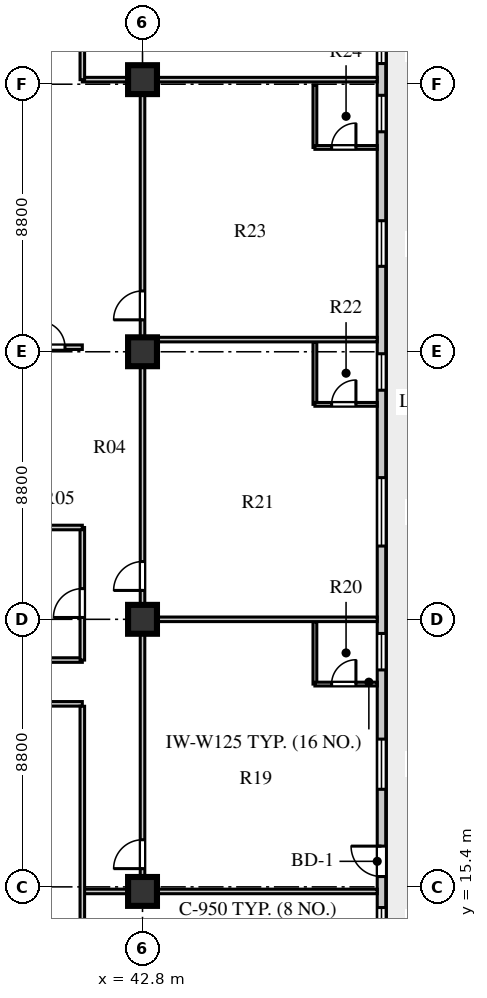
"""IFC4 building model, lengths in metres.
Left out: names, types, materials, properties, quantities, classifications, styles, units other than length and angle.
Written with IfcOpenShell. Run it as: python <this file> out.ifc"""

import sys

from ifc_helpers import new_model, si_unit, direction, frame, frame_2d, origin, origin_2d, place, context, subcontext, project, spatial, rectangle, extrude, element, fill, save


model = new_model("IFC4")
c1 = context("Model", 3, precision=1e-05, world=origin(), true_north=direction((0.0, 1.0)))
c2 = subcontext(c1, "Body", "Model", "MODEL_VIEW")
j1 = project(units=[si_unit("LENGTHUNIT", "METRE"), si_unit("PLANEANGLEUNIT", "RADIAN")], contexts=[c1])
p1 = place(None, origin())
s1 = spatial("IfcSite", under=j1, at=p1, CompositionType="ELEMENT")
p2 = place(p1, origin())
s2 = spatial("IfcBuilding", under=s1, at=p2, CompositionType="ELEMENT")
p3 = place(p2, frame((0.0, 0.0, 196.4)))
s3 = spatial("IfcBuildingStorey", under=s2, at=p3, CompositionType="ELEMENT", Elevation=196.4)
for number, where, z_axis, x_axis in (
    (1, (42.8, 15.25, 0.0), (0.0, 0.0, 1.0), (1.0, 0.0, 0.0)),
    (2, (42.8, 24.2, 0.0), (0.0, 0.0, 1.0), (1.0, 0.0, 0.0)),
    (3, (42.8, 33.0, 0.0), (0.0, 0.0, 1.0), (1.0, 0.0, 0.0)),
    (4, (42.8, 41.95, 0.0), (0.0, 0.0, 1.0), (1.0, 0.0, 0.0)),
):
    element("IfcColumn", number, at=place(p3, frame(where, z_axis=z_axis, x_axis=x_axis)), inside=s3, PredefinedType="COLUMN", context=c2, shape_type="SweptSolid", body=[
        extrude(rectangle(XDim=0.95, YDim=0.95, at=origin_2d()), origin(), (0.0, 0.0, 1.0), 3.6),
    ])
p4 = place(p3, frame((50.66, 13.13, 0.0), z_axis=(0.0, 0.0, 1.0), x_axis=(0.0, 1.0, 0.0)))
e5 = element("IfcWall", 5, at=p4, inside=s3, PredefinedType="STANDARD", context=c2, shape_type="SweptSolid", body=[
    extrude(rectangle(XDim=30.94, YDim=0.28, at=frame_2d((15.47, 0.0))), origin(), (0.0, 0.0, 1.0), 3.6),
])
p5 = place(p4, frame((0.64, 0.0, 0.8)))
e6 = element("IfcOpeningElement", 6, at=p5, cuts=e5, PredefinedType="OPENING", context=c2, shape_type="SweptSolid", body=[
    extrude(rectangle(XDim=0.95, YDim=1.65, at=frame_2d((0.475, 0.825))), frame((0.0, 0.15, 0.0), z_axis=(0.0, -1.0, 0.0), x_axis=(1.0, 0.0, 0.0)), (0.0, 0.0, 1.0), 0.3),
])
p6 = place(p4, frame((2.61, 0.0, 0.0)))
e7 = element("IfcOpeningElement", 7, at=p6, cuts=e5, PredefinedType="OPENING", context=c2, shape_type="SweptSolid", body=[
    extrude(rectangle(XDim=1.0, YDim=2.05, at=frame_2d((0.5, 1.025))), frame((0.0, 0.15, 0.0), z_axis=(0.0, -1.0, 0.0), x_axis=(1.0, 0.0, 0.0)), (0.0, 0.0, 1.0), 0.3),
])
p7 = place(p4, frame((5.48, 0.0, 0.8)))
e8 = element("IfcOpeningElement", 8, at=p7, cuts=e5, PredefinedType="OPENING", context=c2, shape_type="SweptSolid", body=[
    extrude(rectangle(XDim=1.65, YDim=1.95, at=frame_2d((0.825, 0.975))), frame((0.0, 0.15, 0.0), z_axis=(0.0, -1.0, 0.0), x_axis=(1.0, 0.0, 0.0)), (0.0, 0.0, 1.0), 0.3),
])
p8 = place(p4, frame((9.405, 0.0, 0.8)))
e9 = element("IfcOpeningElement", 9, at=p8, cuts=e5, PredefinedType="OPENING", context=c2, shape_type="SweptSolid", body=[
    extrude(rectangle(XDim=1.2, YDim=1.75, at=frame_2d((0.6, 0.875))), frame((0.0, 0.15, 0.0), z_axis=(0.0, -1.0, 0.0), x_axis=(1.0, 0.0, 0.0)), (0.0, 0.0, 1.0), 0.3),
])
p9 = place(p4, frame((13.48, 0.0, 0.8)))
e10 = element("IfcOpeningElement", 10, at=p9, cuts=e5, PredefinedType="OPENING", context=c2, shape_type="SweptSolid", body=[
    extrude(rectangle(XDim=2.25, YDim=2.0, at=frame_2d((1.125, 1.0))), frame((0.0, 0.15, 0.0), z_axis=(0.0, -1.0, 0.0), x_axis=(1.0, 0.0, 0.0)), (0.0, 0.0, 1.0), 0.3),
])
p10 = place(p4, frame((18.605, 0.0, 0.8)))
e11 = element("IfcOpeningElement", 11, at=p10, cuts=e5, PredefinedType="OPENING", context=c2, shape_type="SweptSolid", body=[
    extrude(rectangle(XDim=1.2, YDim=1.75, at=frame_2d((0.6, 0.875))), frame((0.0, 0.15, 0.0), z_axis=(0.0, -1.0, 0.0), x_axis=(1.0, 0.0, 0.0)), (0.0, 0.0, 1.0), 0.3),
])
p11 = place(p4, frame((22.68, 0.0, 0.8)))
e12 = element("IfcOpeningElement", 12, at=p11, cuts=e5, PredefinedType="OPENING", context=c2, shape_type="SweptSolid", body=[
    extrude(rectangle(XDim=1.5, YDim=2.0, at=frame_2d((0.75, 1.0))), frame((0.0, 0.15, 0.0), z_axis=(0.0, -1.0, 0.0), x_axis=(1.0, 0.0, 0.0)), (0.0, 0.0, 1.0), 0.3),
])
p12 = place(p4, frame((27.105, 0.0, 0.8)))
e13 = element("IfcOpeningElement", 13, at=p12, cuts=e5, PredefinedType="OPENING", context=c2, shape_type="SweptSolid", body=[
    extrude(rectangle(XDim=1.2, YDim=1.75, at=frame_2d((0.6, 0.875))), frame((0.0, 0.15, 0.0), z_axis=(0.0, -1.0, 0.0), x_axis=(1.0, 0.0, 0.0)), (0.0, 0.0, 1.0), 0.3),
])
p13 = place(p4, frame((29.35, 0.0, 0.8)))
e14 = element("IfcOpeningElement", 14, at=p13, cuts=e5, PredefinedType="OPENING", context=c2, shape_type="SweptSolid", body=[
    extrude(rectangle(XDim=0.95, YDim=1.65, at=frame_2d((0.475, 0.825))), frame((0.0, 0.15, 0.0), z_axis=(0.0, -1.0, 0.0), x_axis=(1.0, 0.0, 0.0)), (0.0, 0.0, 1.0), 0.3),
])
p14 = place(p3, frame((25.22, 21.42, 0.0), z_axis=(0.0, 0.0, 1.0), x_axis=(1.0, 0.0, 0.0)))
e15 = element("IfcWall", 15, at=p14, inside=s3, PredefinedType="PARTITIONING", context=c2, shape_type="SweptSolid", body=[
    extrude(rectangle(XDim=15.6, YDim=0.15, at=frame_2d((7.8, 0.0))), origin(), (0.0, 0.0, 1.0), 3.25),
])
p15 = place(p14, frame((0.73, 0.0, 0.0)))
e16 = element("IfcOpeningElement", 16, at=p15, cuts=e15, PredefinedType="OPENING", context=c2, shape_type="SweptSolid", body=[
    extrude(rectangle(XDim=0.95, YDim=2.1, at=frame_2d((0.475, 1.05))), frame((0.0, 0.085, 0.0), z_axis=(0.0, -1.0, 0.0), x_axis=(1.0, 0.0, 0.0)), (0.0, 0.0, 1.0), 0.17),
])
p16 = place(p3, frame((27.15, 22.86, 0.0), z_axis=(0.0, 0.0, 1.0), x_axis=(1.0, 0.0, 0.0)))
e17 = element("IfcWall", 17, at=p16, inside=s3, PredefinedType="PARTITIONING", context=c2, shape_type="SweptSolid", body=[
    extrude(rectangle(XDim=13.67, YDim=0.15, at=frame_2d((6.835, 0.0))), origin(), (0.0, 0.0, 1.0), 3.6),
])
p17 = place(p16, frame((2.2, 0.0, 0.0)))
e18 = element("IfcOpeningElement", 18, at=p17, cuts=e17, PredefinedType="OPENING", context=c2, shape_type="SweptSolid", body=[
    extrude(rectangle(XDim=0.9, YDim=2.08, at=frame_2d((0.45, 1.04))), frame((0.0, 0.085, 0.0), z_axis=(0.0, -1.0, 0.0), x_axis=(1.0, 0.0, 0.0)), (0.0, 0.0, 1.0), 0.17),
])
p18 = place(p3, frame((42.8, 15.25, 0.0), z_axis=(0.0, 0.0, 1.0), x_axis=(0.0, 1.0, 0.0)))
e19 = element("IfcWall", 19, at=p18, inside=s3, PredefinedType="PARTITIONING", context=c2, shape_type="SweptSolid", body=[
    extrude(rectangle(XDim=26.7, YDim=0.15, at=frame_2d((13.35, 0.0))), origin(), (0.0, 0.0, 1.0), 2.95),
])
p19 = place(p18, frame((0.75, 0.0, 0.0)))
e20 = element("IfcOpeningElement", 20, at=p19, cuts=e19, PredefinedType="OPENING", context=c2, shape_type="SweptSolid", body=[
    extrude(rectangle(XDim=0.95, YDim=2.1, at=frame_2d((0.475, 1.05))), frame((0.0, 0.085, 0.0), z_axis=(0.0, -1.0, 0.0), x_axis=(1.0, 0.0, 0.0)), (0.0, 0.0, 1.0), 0.17),
])
p20 = place(p18, frame((9.9, 0.0, 0.0)))
e21 = element("IfcOpeningElement", 21, at=p20, cuts=e19, PredefinedType="OPENING", context=c2, shape_type="SweptSolid", body=[
    extrude(rectangle(XDim=0.95, YDim=2.1, at=frame_2d((0.475, 1.05))), frame((0.0, 0.085, 0.0), z_axis=(0.0, -1.0, 0.0), x_axis=(1.0, 0.0, 0.0)), (0.0, 0.0, 1.0), 0.17),
])
p21 = place(p18, frame((18.8, 0.0, 0.0)))
e22 = element("IfcOpeningElement", 22, at=p21, cuts=e19, PredefinedType="OPENING", context=c2, shape_type="SweptSolid", body=[
    extrude(rectangle(XDim=0.95, YDim=2.1, at=frame_2d((0.475, 1.05))), frame((0.0, 0.085, 0.0), z_axis=(0.0, -1.0, 0.0), x_axis=(1.0, 0.0, 0.0)), (0.0, 0.0, 1.0), 0.17),
])
for number, where, z_axis, x_axis in (
    (23, (40.82, 15.25, 0.0), (0.0, 0.0, 1.0), (1.0, 0.0, 0.0)),
    (24, (40.82, 41.95, 0.0), (0.0, 0.0, 1.0), (1.0, 0.0, 0.0)),
):
    element("IfcWall", number, at=place(p3, frame(where, z_axis=z_axis, x_axis=x_axis)), inside=s3, PredefinedType="PARTITIONING", context=c2, shape_type="SweptSolid", body=[
        extrude(rectangle(XDim=9.7, YDim=0.15, at=frame_2d((4.85, 0.0))), origin(), (0.0, 0.0, 1.0), 2.95),
    ])
p22 = place(p3, frame((40.82, 22.86, 0.0), z_axis=(0.0, 0.0, 1.0), x_axis=(0.0, 1.0, 0.0)))
e25 = element("IfcWall", 25, at=p22, inside=s3, PredefinedType="PARTITIONING", context=c2, shape_type="SweptSolid", body=[
    extrude(rectangle(XDim=4.36, YDim=0.15, at=frame_2d((2.18, 0.0))), origin(), (0.0, 0.0, 1.0), 3.6),
])
p23 = place(p22, frame((1.4, 0.0, 0.0)))
e26 = element("IfcOpeningElement", 26, at=p23, cuts=e25, PredefinedType="OPENING", context=c2, shape_type="SweptSolid", body=[
    extrude(rectangle(XDim=0.95, YDim=2.1, at=frame_2d((0.475, 1.05))), frame((0.0, 0.085, 0.0), z_axis=(0.0, -1.0, 0.0), x_axis=(1.0, 0.0, 0.0)), (0.0, 0.0, 1.0), 0.17),
])
p24 = place(p3, frame((36.9, 27.22, 0.0), z_axis=(0.0, 0.0, 1.0), x_axis=(1.0, 0.0, 0.0)))
e27 = element("IfcWall", 27, at=p24, inside=s3, PredefinedType="PARTITIONING", context=c2, shape_type="SweptSolid", body=[
    extrude(rectangle(XDim=3.92, YDim=0.15, at=frame_2d((1.96, 0.0))), origin(), (0.0, 0.0, 1.0), 3.25),
])
p25 = place(p3, frame((40.82, 7.88, 0.0), z_axis=(0.0, 0.0, 1.0), x_axis=(0.0, 1.0, 0.0)))
e28 = element("IfcWall", 28, at=p25, inside=s3, PredefinedType="PARTITIONING", context=c2, shape_type="SweptSolid", body=[
    extrude(rectangle(XDim=13.46, YDim=0.15, at=frame_2d((6.73, 0.0))), origin(), (0.0, 0.0, 1.0), 3.6),
])
p26 = place(p3, frame((48.47, 22.07, 0.0), z_axis=(0.0, 0.0, 1.0), x_axis=(0.0, 1.0, 0.0)))
e29 = element("IfcWall", 29, at=p26, inside=s3, PredefinedType="PLUMBINGWALL", context=c2, shape_type="SweptSolid", body=[
    extrude(rectangle(XDim=2.05, YDim=0.125, at=frame_2d((1.025, 0.0))), origin(), (0.0, 0.0, 1.0), 3.6),
])
p27 = place(p3, frame((48.47, 22.07, 0.0), z_axis=(0.0, 0.0, 1.0), x_axis=(1.0, 0.0, 0.0)))
e30 = element("IfcWall", 30, at=p27, inside=s3, PredefinedType="PLUMBINGWALL", context=c2, shape_type="SweptSolid", body=[
    extrude(rectangle(XDim=2.05, YDim=0.125, at=frame_2d((1.025, 0.0))), origin(), (0.0, 0.0, 1.0), 3.6),
])
p28 = place(p27, frame((0.55, 0.0, 0.0)))
e31 = element("IfcOpeningElement", 31, at=p28, cuts=e30, PredefinedType="OPENING", context=c2, shape_type="SweptSolid", body=[
    extrude(rectangle(XDim=0.8, YDim=2.05, at=frame_2d((0.4, 1.025))), frame((0.0, 0.073, 0.0), z_axis=(0.0, -1.0, 0.0), x_axis=(1.0, 0.0, 0.0)), (0.0, 0.0, 1.0), 0.145),
])
p29 = place(p3, frame((42.88, 24.2, 0.0), z_axis=(0.0, 0.0, 1.0), x_axis=(1.0, 0.0, 0.0)))
e32 = element("IfcWall", 32, at=p29, inside=s3, PredefinedType="PARTITIONING", context=c2, shape_type="SweptSolid", body=[
    extrude(rectangle(XDim=7.64, YDim=0.15, at=frame_2d((3.82, 0.0))), origin(), (0.0, 0.0, 1.0), 3.15),
])
p30 = place(p3, frame((48.47, 31.27, 0.0), z_axis=(0.0, 0.0, 1.0), x_axis=(0.0, 1.0, 0.0)))
e33 = element("IfcWall", 33, at=p30, inside=s3, PredefinedType="PLUMBINGWALL", context=c2, shape_type="SweptSolid", body=[
    extrude(rectangle(XDim=2.05, YDim=0.125, at=frame_2d((1.025, 0.0))), origin(), (0.0, 0.0, 1.0), 3.6),
])
p31 = place(p3, frame((48.47, 31.27, 0.0), z_axis=(0.0, 0.0, 1.0), x_axis=(1.0, 0.0, 0.0)))
e34 = element("IfcWall", 34, at=p31, inside=s3, PredefinedType="PLUMBINGWALL", context=c2, shape_type="SweptSolid", body=[
    extrude(rectangle(XDim=2.05, YDim=0.125, at=frame_2d((1.025, 0.0))), origin(), (0.0, 0.0, 1.0), 3.6),
])
p32 = place(p31, frame((0.55, 0.0, 0.0)))
e35 = element("IfcOpeningElement", 35, at=p32, cuts=e34, PredefinedType="OPENING", context=c2, shape_type="SweptSolid", body=[
    extrude(rectangle(XDim=0.8, YDim=2.05, at=frame_2d((0.4, 1.025))), frame((0.0, 0.073, 0.0), z_axis=(0.0, -1.0, 0.0), x_axis=(1.0, 0.0, 0.0)), (0.0, 0.0, 1.0), 0.145),
])
p33 = place(p3, frame((42.88, 33.4, 0.0), z_axis=(0.0, 0.0, 1.0), x_axis=(1.0, 0.0, 0.0)))
e36 = element("IfcWall", 36, at=p33, inside=s3, PredefinedType="PARTITIONING", context=c2, shape_type="SweptSolid", body=[
    extrude(rectangle(XDim=7.64, YDim=0.15, at=frame_2d((3.82, 0.0))), origin(), (0.0, 0.0, 1.0), 3.6),
])
p34 = place(p3, frame((48.47, 39.72, 0.0), z_axis=(0.0, 0.0, 1.0), x_axis=(0.0, 1.0, 0.0)))
e37 = element("IfcWall", 37, at=p34, inside=s3, PredefinedType="PLUMBINGWALL", context=c2, shape_type="SweptSolid", body=[
    extrude(rectangle(XDim=2.05, YDim=0.125, at=frame_2d((1.025, 0.0))), origin(), (0.0, 0.0, 1.0), 3.6),
])
p35 = place(p3, frame((48.47, 39.72, 0.0), z_axis=(0.0, 0.0, 1.0), x_axis=(1.0, 0.0, 0.0)))
e38 = element("IfcWall", 38, at=p35, inside=s3, PredefinedType="PLUMBINGWALL", context=c2, shape_type="SweptSolid", body=[
    extrude(rectangle(XDim=2.05, YDim=0.125, at=frame_2d((1.025, 0.0))), origin(), (0.0, 0.0, 1.0), 3.6),
])
p36 = place(p35, frame((0.55, 0.0, 0.0)))
e39 = element("IfcOpeningElement", 39, at=p36, cuts=e38, PredefinedType="OPENING", context=c2, shape_type="SweptSolid", body=[
    extrude(rectangle(XDim=0.8, YDim=2.05, at=frame_2d((0.4, 1.025))), frame((0.0, 0.073, 0.0), z_axis=(0.0, -1.0, 0.0), x_axis=(1.0, 0.0, 0.0)), (0.0, 0.0, 1.0), 0.145),
])
p37 = place(p3, frame((38.95, 33.15, 0.0), z_axis=(0.0, 0.0, 1.0), x_axis=(1.0, 0.0, 0.0)))
e40 = element("IfcWall", 40, at=p37, inside=s3, PredefinedType="PARTITIONING", context=c2, shape_type="SweptSolid", body=[
    extrude(rectangle(XDim=1.87, YDim=0.15, at=frame_2d((0.935, 0.0))), origin(), (0.0, 0.0, 1.0), 3.6),
])
p38 = place(p37, frame((0.45, 0.0, 0.0)))
e41 = element("IfcOpeningElement", 41, at=p38, cuts=e40, PredefinedType="OPENING", context=c2, shape_type="SweptSolid", body=[
    extrude(rectangle(XDim=0.85, YDim=2.05, at=frame_2d((0.425, 1.025))), frame((0.0, 0.085, 0.0), z_axis=(0.0, -1.0, 0.0), x_axis=(1.0, 0.0, 0.0)), (0.0, 0.0, 1.0), 0.17),
])
p39 = place(p3, frame((40.82, 41.95, 0.0), z_axis=(0.0, 0.0, 1.0), x_axis=(0.0, 1.0, 0.0)))
e42 = element("IfcWall", 42, at=p39, inside=s3, PredefinedType="PARTITIONING", context=c2, shape_type="SweptSolid", body=[
    extrude(rectangle(XDim=7.37, YDim=0.15, at=frame_2d((3.685, 0.0))), origin(), (0.0, 0.0, 1.0), 3.6),
])
p40 = place(p5, origin())
e43 = element("IfcWindow", 43, at=p40, inside=s3, PartitioningType="SINGLE_PANEL", PredefinedType="WINDOW", context=c2, shape_type="SweptSolid", body=[
    extrude(rectangle(XDim=0.95, YDim=1.65, at=frame_2d((0.475, 0.825))), frame((0.0, 0.03, 0.0), z_axis=(0.0, -1.0, 0.0), x_axis=(1.0, 0.0, 0.0)), (0.0, 0.0, 1.0), 0.06),
])
fill(e6, e43)
p41 = place(p6, frame((1.0, 0.0, 0.0), z_axis=(0.0, 0.0, 1.0), x_axis=(-1.0, 0.0, 0.0)))
e44 = element("IfcDoor", 44, at=p41, inside=s3, OperationType="SINGLE_SWING_LEFT", PredefinedType="DOOR", context=c2, shape_type="SweptSolid", body=[
    extrude(rectangle(XDim=1.0, YDim=2.05, at=frame_2d((0.5, 1.025))), frame((0.0, 0.025, 0.0), z_axis=(0.0, -1.0, 0.0), x_axis=(1.0, 0.0, 0.0)), (0.0, 0.0, 1.0), 0.05),
])
fill(e7, e44)
p42 = place(p7, origin())
e45 = element("IfcWindow", 45, at=p42, inside=s3, PartitioningType="SINGLE_PANEL", PredefinedType="WINDOW", context=c2, shape_type="SweptSolid", body=[
    extrude(rectangle(XDim=1.65, YDim=1.95, at=frame_2d((0.825, 0.975))), frame((0.0, 0.03, 0.0), z_axis=(0.0, -1.0, 0.0), x_axis=(1.0, 0.0, 0.0)), (0.0, 0.0, 1.0), 0.06),
])
fill(e8, e45)
p43 = place(p8, origin())
e46 = element("IfcWindow", 46, at=p43, inside=s3, PartitioningType="SINGLE_PANEL", PredefinedType="WINDOW", context=c2, shape_type="SweptSolid", body=[
    extrude(rectangle(XDim=1.2, YDim=1.75, at=frame_2d((0.6, 0.875))), frame((0.0, 0.03, 0.0), z_axis=(0.0, -1.0, 0.0), x_axis=(1.0, 0.0, 0.0)), (0.0, 0.0, 1.0), 0.06),
])
fill(e9, e46)
p44 = place(p9, origin())
e47 = element("IfcWindow", 47, at=p44, inside=s3, PartitioningType="SINGLE_PANEL", PredefinedType="WINDOW", context=c2, shape_type="SweptSolid", body=[
    extrude(rectangle(XDim=2.25, YDim=2.0, at=frame_2d((1.125, 1.0))), frame((0.0, 0.03, 0.0), z_axis=(0.0, -1.0, 0.0), x_axis=(1.0, 0.0, 0.0)), (0.0, 0.0, 1.0), 0.06),
])
fill(e10, e47)
p45 = place(p10, origin())
e48 = element("IfcWindow", 48, at=p45, inside=s3, PartitioningType="SINGLE_PANEL", PredefinedType="WINDOW", context=c2, shape_type="SweptSolid", body=[
    extrude(rectangle(XDim=1.2, YDim=1.75, at=frame_2d((0.6, 0.875))), frame((0.0, 0.03, 0.0), z_axis=(0.0, -1.0, 0.0), x_axis=(1.0, 0.0, 0.0)), (0.0, 0.0, 1.0), 0.06),
])
fill(e11, e48)
p46 = place(p11, origin())
e49 = element("IfcWindow", 49, at=p46, inside=s3, PartitioningType="SINGLE_PANEL", PredefinedType="WINDOW", context=c2, shape_type="SweptSolid", body=[
    extrude(rectangle(XDim=1.5, YDim=2.0, at=frame_2d((0.75, 1.0))), frame((0.0, 0.03, 0.0), z_axis=(0.0, -1.0, 0.0), x_axis=(1.0, 0.0, 0.0)), (0.0, 0.0, 1.0), 0.06),
])
fill(e12, e49)
p47 = place(p12, origin())
e50 = element("IfcWindow", 50, at=p47, inside=s3, PartitioningType="SINGLE_PANEL", PredefinedType="WINDOW", context=c2, shape_type="SweptSolid", body=[
    extrude(rectangle(XDim=1.2, YDim=1.75, at=frame_2d((0.6, 0.875))), frame((0.0, 0.03, 0.0), z_axis=(0.0, -1.0, 0.0), x_axis=(1.0, 0.0, 0.0)), (0.0, 0.0, 1.0), 0.06),
])
fill(e13, e50)
p48 = place(p13, origin())
e51 = element("IfcWindow", 51, at=p48, inside=s3, PartitioningType="SINGLE_PANEL", PredefinedType="WINDOW", context=c2, shape_type="SweptSolid", body=[
    extrude(rectangle(XDim=0.95, YDim=1.65, at=frame_2d((0.475, 0.825))), frame((0.0, 0.03, 0.0), z_axis=(0.0, -1.0, 0.0), x_axis=(1.0, 0.0, 0.0)), (0.0, 0.0, 1.0), 0.06),
])
fill(e14, e51)
p49 = place(p23, frame((0.95, 0.0, 0.0), z_axis=(0.0, 0.0, 1.0), x_axis=(-1.0, 0.0, 0.0)))
e52 = element("IfcDoor", 52, at=p49, inside=s3, OperationType="SINGLE_SWING_RIGHT", PredefinedType="DOOR", context=c2, shape_type="SweptSolid", body=[
    extrude(rectangle(XDim=0.95, YDim=2.1, at=frame_2d((0.475, 1.05))), frame((0.0, 0.025, 0.0), z_axis=(0.0, -1.0, 0.0), x_axis=(1.0, 0.0, 0.0)), (0.0, 0.0, 1.0), 0.05),
])
fill(e26, e52)
p50 = place(p19, origin())
e53 = element("IfcDoor", 53, at=p50, inside=s3, OperationType="SINGLE_SWING_LEFT", PredefinedType="DOOR", context=c2, shape_type="SweptSolid", body=[
    extrude(rectangle(XDim=0.95, YDim=2.1, at=frame_2d((0.475, 1.05))), frame((0.0, 0.025, 0.0), z_axis=(0.0, -1.0, 0.0), x_axis=(1.0, 0.0, 0.0)), (0.0, 0.0, 1.0), 0.05),
])
fill(e20, e53)
p51 = place(p28, frame((0.8, 0.0, 0.0), z_axis=(0.0, 0.0, 1.0), x_axis=(-1.0, 0.0, 0.0)))
e54 = element("IfcDoor", 54, at=p51, inside=s3, OperationType="SINGLE_SWING_LEFT", PredefinedType="DOOR", context=c2, shape_type="SweptSolid", body=[
    extrude(rectangle(XDim=0.8, YDim=2.05, at=frame_2d((0.4, 1.025))), frame((0.0, 0.025, 0.0), z_axis=(0.0, -1.0, 0.0), x_axis=(1.0, 0.0, 0.0)), (0.0, 0.0, 1.0), 0.05),
])
fill(e31, e54)
p52 = place(p20, origin())
e55 = element("IfcDoor", 55, at=p52, inside=s3, OperationType="SINGLE_SWING_LEFT", PredefinedType="DOOR", context=c2, shape_type="SweptSolid", body=[
    extrude(rectangle(XDim=0.95, YDim=2.1, at=frame_2d((0.475, 1.05))), frame((0.0, 0.025, 0.0), z_axis=(0.0, -1.0, 0.0), x_axis=(1.0, 0.0, 0.0)), (0.0, 0.0, 1.0), 0.05),
])
fill(e21, e55)
p53 = place(p32, frame((0.8, 0.0, 0.0), z_axis=(0.0, 0.0, 1.0), x_axis=(-1.0, 0.0, 0.0)))
e56 = element("IfcDoor", 56, at=p53, inside=s3, OperationType="SINGLE_SWING_LEFT", PredefinedType="DOOR", context=c2, shape_type="SweptSolid", body=[
    extrude(rectangle(XDim=0.8, YDim=2.05, at=frame_2d((0.4, 1.025))), frame((0.0, 0.025, 0.0), z_axis=(0.0, -1.0, 0.0), x_axis=(1.0, 0.0, 0.0)), (0.0, 0.0, 1.0), 0.05),
])
fill(e35, e56)
p54 = place(p21, origin())
e57 = element("IfcDoor", 57, at=p54, inside=s3, OperationType="SINGLE_SWING_LEFT", PredefinedType="DOOR", context=c2, shape_type="SweptSolid", body=[
    extrude(rectangle(XDim=0.95, YDim=2.1, at=frame_2d((0.475, 1.05))), frame((0.0, 0.025, 0.0), z_axis=(0.0, -1.0, 0.0), x_axis=(1.0, 0.0, 0.0)), (0.0, 0.0, 1.0), 0.05),
])
fill(e22, e57)
p55 = place(p36, frame((0.8, 0.0, 0.0), z_axis=(0.0, 0.0, 1.0), x_axis=(-1.0, 0.0, 0.0)))
e58 = element("IfcDoor", 58, at=p55, inside=s3, OperationType="SINGLE_SWING_LEFT", PredefinedType="DOOR", context=c2, shape_type="SweptSolid", body=[
    extrude(rectangle(XDim=0.8, YDim=2.05, at=frame_2d((0.4, 1.025))), frame((0.0, 0.025, 0.0), z_axis=(0.0, -1.0, 0.0), x_axis=(1.0, 0.0, 0.0)), (0.0, 0.0, 1.0), 0.05),
])
fill(e39, e58)
p56 = place(p38, origin())
e59 = element("IfcDoor", 59, at=p56, inside=s3, OperationType="SINGLE_SWING_LEFT", PredefinedType="DOOR", context=c2, shape_type="SweptSolid", body=[
    extrude(rectangle(XDim=0.85, YDim=2.05, at=frame_2d((0.425, 1.025))), frame((0.0, 0.025, 0.0), z_axis=(0.0, -1.0, 0.0), x_axis=(1.0, 0.0, 0.0)), (0.0, 0.0, 1.0), 0.05),
])
fill(e41, e59)
save(model, sys.argv[1])
